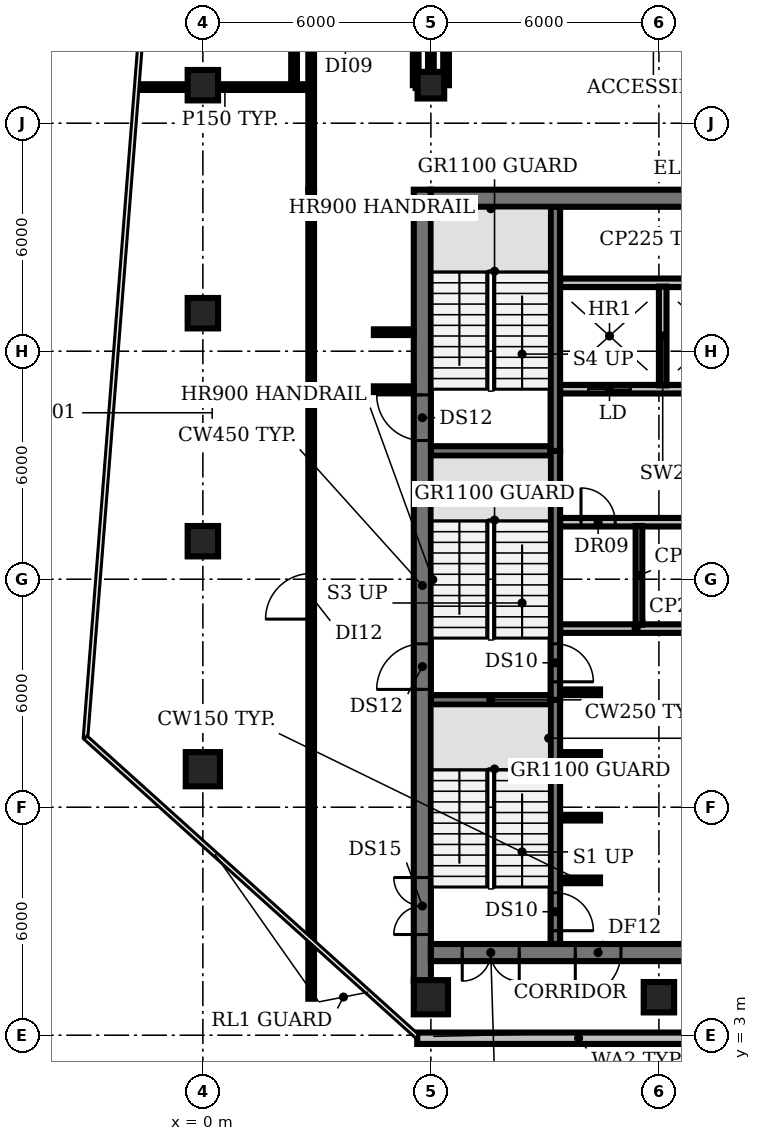
"""IFC4 building model, lengths in metres.
Left out: names, types, materials, properties, quantities, classifications, styles, units other than length and angle.
Written with IfcOpenShell. Run it as: python <this file> out.ifc"""

import sys

from ifc_helpers import new_model, si_unit, direction, frame, frame_2d, origin, origin_2d, place, context, subcontext, project, spatial, rectangle, circle, extrude, element, fill, save


model = new_model("IFC4")
c1 = context("Model", 3, precision=1e-05, world=origin(), true_north=direction((0.0, 1.0)))
c2 = subcontext(c1, "Body", "Model", "MODEL_VIEW")
j1 = project(units=[si_unit("LENGTHUNIT", "METRE"), si_unit("PLANEANGLEUNIT", "RADIAN")], contexts=[c1])
p1 = place(None, origin())
s1 = spatial("IfcSite", under=j1, at=p1, CompositionType="ELEMENT")
p2 = place(p1, origin())
s2 = spatial("IfcBuilding", under=s1, at=p2, CompositionType="ELEMENT")
p3 = place(p2, frame((0.0, 0.0, 247.4)))
s3 = spatial("IfcBuildingStorey", under=s2, at=p3, CompositionType="ELEMENT", Elevation=247.4)
p4 = place(p3, frame((0.0, 10.0, 0.0), z_axis=(0.0, 0.0, 1.0), x_axis=(1.0, 0.0, 0.0)))
e1 = element("IfcColumn", 1, at=p4, inside=s3, PredefinedType="COLUMN", context=c2, shape_type="SweptSolid", body=[
    extrude(circle(Radius=0.45, at=origin_2d()), origin(), (0.0, 0.0, 1.0), 3.85),
])
for number, where, z_axis, x_axis in (
    (2, (0.0, 16.0, 0.0), (0.0, 0.0, 1.0), (1.0, 0.0, 0.0)),
    (3, (0.0, 22.0, 0.0), (0.0, 0.0, 1.0), (1.0, 0.0, 0.0)),
    (4, (0.0, 28.0, 0.0), (0.0, 0.0, 1.0), (1.0, 0.0, 0.0)),
):
    element("IfcColumn", number, at=place(p3, frame(where, z_axis=z_axis, x_axis=x_axis)), inside=s3, PredefinedType="COLUMN", context=c2, shape_type="SweptSolid", body=[
        extrude(rectangle(XDim=0.8, YDim=0.8, at=origin_2d()), origin(), (0.0, 0.0, 1.0), 3.85),
    ])
p5 = place(p3, frame((6.0, 4.0, 0.0), z_axis=(0.0, 0.0, 1.0), x_axis=(1.0, 0.0, 0.0)))
e5 = element("IfcColumn", 5, at=p5, inside=s3, PredefinedType="COLUMN", context=c2, shape_type="SweptSolid", body=[
    extrude(circle(Radius=0.45, at=origin_2d()), origin(), (0.0, 0.0, 1.0), 3.85),
])
p6 = place(p3, frame((6.0, 28.0, 0.0), z_axis=(0.0, 0.0, 1.0), x_axis=(1.0, 0.0, 0.0)))
e6 = element("IfcColumn", 6, at=p6, inside=s3, PredefinedType="COLUMN", context=c2, shape_type="SweptSolid", body=[
    extrude(rectangle(XDim=0.7, YDim=0.7, at=origin_2d()), origin(), (0.0, 0.0, 1.0), 3.85),
])
p7 = place(p3, frame((12.0, 4.0, 0.0), z_axis=(0.0, 0.0, 1.0), x_axis=(1.0, 0.0, 0.0)))
e7 = element("IfcColumn", 7, at=p7, inside=s3, PredefinedType="COLUMN", context=c2, shape_type="SweptSolid", body=[
    extrude(rectangle(XDim=0.8, YDim=0.8, at=origin_2d()), origin(), (0.0, 0.0, 1.0), 3.85),
])
p8 = place(p3, frame((5.64, 2.92, 0.0), z_axis=(0.0, 0.0, 1.0), x_axis=(1.0, 0.0, 0.0)))
e8 = element("IfcWall", 8, at=p8, inside=s3, PredefinedType="SOLIDWALL", context=c2, shape_type="SweptSolid", body=[
    extrude(rectangle(XDim=8.493, YDim=0.3, at=frame_2d((4.247, 0.0))), origin(), (0.0, 0.0, 1.0), 3.85),
])
for number, where, z_axis, x_axis in (
    (9, (9.4, 7.075, 0.0), (0.0, 0.0, 1.0), (1.0, 0.0, 0.0)),
    (10, (9.4, 8.725, 0.0), (0.0, 0.0, 1.0), (1.0, 0.0, 0.0)),
    (11, (9.4, 10.375, 0.0), (0.0, 0.0, 1.0), (1.0, 0.0, 0.0)),
):
    element("IfcWall", number, at=place(p3, frame(where, z_axis=z_axis, x_axis=x_axis)), inside=s3, PredefinedType="SHEAR", context=c2, shape_type="SweptSolid", body=[
        extrude(rectangle(XDim=1.05, YDim=0.15, at=frame_2d((0.525, 0.0))), origin(), (0.0, 0.0, 1.0), 3.85),
    ])
p9 = place(p3, frame((6.0, 11.825, 0.0), z_axis=(0.0, 0.0, 1.0), x_axis=(1.0, 0.0, 0.0)))
e12 = element("IfcWall", 12, at=p9, inside=s3, PredefinedType="SHEAR", context=c2, shape_type="SweptSolid", body=[
    extrude(rectangle(XDim=3.15, YDim=0.25, at=frame_2d((1.575, 0.0))), origin(), (0.0, 0.0, 1.0), 3.85),
])
p10 = place(p3, frame((9.4, 12.025, 0.0), z_axis=(0.0, 0.0, 1.0), x_axis=(1.0, 0.0, 0.0)))
e13 = element("IfcWall", 13, at=p10, inside=s3, PredefinedType="SHEAR", context=c2, shape_type="SweptSolid", body=[
    extrude(rectangle(XDim=1.05, YDim=0.15, at=frame_2d((0.525, 0.0))), origin(), (0.0, 0.0, 1.0), 3.85),
])
p11 = place(p3, frame((9.4, 13.7, 0.0), z_axis=(0.0, 0.0, 1.0), x_axis=(1.0, 0.0, 0.0)))
e14 = element("IfcWall", 14, at=p11, inside=s3, PredefinedType="PARTITIONING", context=c2, shape_type="SweptSolid", body=[
    extrude(rectangle(XDim=4.0, YDim=0.225, at=frame_2d((2.0, 0.0))), origin(), (0.0, 0.0, 1.0), 3.85),
])
p12 = place(p3, frame((9.4, 16.5, 0.0), z_axis=(0.0, 0.0, 1.0), x_axis=(1.0, 0.0, 0.0)))
e15 = element("IfcWall", 15, at=p12, inside=s3, PredefinedType="PARTITIONING", context=c2, shape_type="SweptSolid", body=[
    extrude(rectangle(XDim=14.6, YDim=0.225, at=frame_2d((7.3, 0.0))), origin(), (0.0, 0.0, 1.0), 3.85),
])
p13 = place(p12, frame((0.55, 0.0, 0.0)))
e16 = element("IfcOpeningElement", 16, at=p13, cuts=e15, PredefinedType="OPENING", context=c2, shape_type="SweptSolid", body=[
    extrude(rectangle(XDim=0.9, YDim=2.1, at=frame_2d((0.45, 1.05))), frame((0.0, 0.123, 0.0), z_axis=(0.0, -1.0, 0.0), x_axis=(1.0, 0.0, 0.0)), (0.0, 0.0, 1.0), 0.245),
])
p14 = place(p12, frame((6.075, 0.0, 0.0)))
e17 = element("IfcOpeningElement", 17, at=p14, cuts=e15, PredefinedType="OPENING", context=c2, shape_type="SweptSolid", body=[
    extrude(rectangle(XDim=1.0, YDim=2.1, at=frame_2d((0.5, 1.05))), frame((0.0, 0.123, 0.0), z_axis=(0.0, -1.0, 0.0), x_axis=(1.0, 0.0, 0.0)), (0.0, 0.0, 1.0), 0.245),
])
p15 = place(p12, frame((11.647, 0.0, 0.0)))
e18 = element("IfcOpeningElement", 18, at=p15, cuts=e15, PredefinedType="OPENING", context=c2, shape_type="SweptSolid", body=[
    extrude(rectangle(XDim=0.9, YDim=2.1, at=frame_2d((0.45, 1.05))), frame((0.0, 0.123, 0.0), z_axis=(0.0, -1.0, 0.0), x_axis=(1.0, 0.0, 0.0)), (0.0, 0.0, 1.0), 0.245),
])
p16 = place(p12, frame((13.423, 0.0, 0.0)))
e19 = element("IfcOpeningElement", 19, at=p16, cuts=e15, PredefinedType="OPENING", context=c2, shape_type="SweptSolid", body=[
    extrude(rectangle(XDim=0.9, YDim=2.1, at=frame_2d((0.45, 1.05))), frame((0.0, 0.123, 0.0), z_axis=(0.0, -1.0, 0.0), x_axis=(1.0, 0.0, 0.0)), (0.0, 0.0, 1.0), 0.245),
])
p17 = place(p3, frame((6.0, 18.375, 0.0), z_axis=(0.0, 0.0, 1.0), x_axis=(1.0, 0.0, 0.0)))
e20 = element("IfcWall", 20, at=p17, inside=s3, PredefinedType="SHEAR", context=c2, shape_type="SweptSolid", body=[
    extrude(rectangle(XDim=3.15, YDim=0.25, at=frame_2d((1.575, 0.0))), origin(), (0.0, 0.0, 1.0), 3.85),
])
p18 = place(p3, frame((24.0, 20.0, 0.0), z_axis=(0.0, 0.0, 1.0), x_axis=(-1.0, 0.0, 0.0)))
e21 = element("IfcWall", 21, at=p18, inside=s3, PredefinedType="PARTITIONING", context=c2, shape_type="SweptSolid", body=[
    extrude(rectangle(XDim=14.6, YDim=0.225, at=frame_2d((7.3, 0.0))), origin(), (0.0, 0.0, 1.0), 3.85),
])
p19 = place(p18, frame((12.75, 0.0, 0.0)))
e22 = element("IfcOpeningElement", 22, at=p19, cuts=e21, PredefinedType="OPENING", context=c2, shape_type="SweptSolid", body=[
    extrude(rectangle(XDim=1.1, YDim=2.1, at=frame_2d((0.55, 1.05))), frame((0.0, 0.123, 0.0), z_axis=(0.0, -1.0, 0.0), x_axis=(1.0, 0.0, 0.0)), (0.0, 0.0, 1.0), 0.245),
])
p20 = place(p18, frame((9.95, 0.0, 0.0)))
e23 = element("IfcOpeningElement", 23, at=p20, cuts=e21, PredefinedType="OPENING", context=c2, shape_type="SweptSolid", body=[
    extrude(rectangle(XDim=1.1, YDim=2.1, at=frame_2d((0.55, 1.05))), frame((0.0, 0.123, 0.0), z_axis=(0.0, -1.0, 0.0), x_axis=(1.0, 0.0, 0.0)), (0.0, 0.0, 1.0), 0.245),
])
p21 = place(p18, frame((7.15, 0.0, 0.0)))
e24 = element("IfcOpeningElement", 24, at=p21, cuts=e21, PredefinedType="OPENING", context=c2, shape_type="SweptSolid", body=[
    extrude(rectangle(XDim=1.1, YDim=2.1, at=frame_2d((0.55, 1.05))), frame((0.0, 0.123, 0.0), z_axis=(0.0, -1.0, 0.0), x_axis=(1.0, 0.0, 0.0)), (0.0, 0.0, 1.0), 0.245),
])
p22 = place(p18, frame((4.35, 0.0, 0.0)))
e25 = element("IfcOpeningElement", 25, at=p22, cuts=e21, PredefinedType="OPENING", context=c2, shape_type="SweptSolid", body=[
    extrude(rectangle(XDim=1.1, YDim=2.1, at=frame_2d((0.55, 1.05))), frame((0.0, 0.123, 0.0), z_axis=(0.0, -1.0, 0.0), x_axis=(1.0, 0.0, 0.0)), (0.0, 0.0, 1.0), 0.245),
])
p23 = place(p18, frame((2.137, 0.0, 0.0)))
e26 = element("IfcOpeningElement", 26, at=p23, cuts=e21, PredefinedType="OPENING", context=c2, shape_type="SweptSolid", body=[
    extrude(rectangle(XDim=0.9, YDim=2.1, at=frame_2d((0.45, 1.05))), frame((0.0, 0.123, 0.0), z_axis=(0.0, -1.0, 0.0), x_axis=(1.0, 0.0, 0.0)), (0.0, 0.0, 1.0), 0.245),
])
p24 = place(p18, frame((0.363, 0.0, 0.0)))
e27 = element("IfcOpeningElement", 27, at=p24, cuts=e21, PredefinedType="OPENING", context=c2, shape_type="SweptSolid", body=[
    extrude(rectangle(XDim=0.9, YDim=2.1, at=frame_2d((0.45, 1.05))), frame((0.0, 0.123, 0.0), z_axis=(0.0, -1.0, 0.0), x_axis=(1.0, 0.0, 0.0)), (0.0, 0.0, 1.0), 0.245),
])
p25 = place(p3, frame((9.4, 22.8, 0.0), z_axis=(0.0, 0.0, 1.0), x_axis=(1.0, 0.0, 0.0)))
e28 = element("IfcWall", 28, at=p25, inside=s3, PredefinedType="PARTITIONING", context=c2, shape_type="SweptSolid", body=[
    extrude(rectangle(XDim=14.6, YDim=0.225, at=frame_2d((7.3, 0.0))), origin(), (0.0, 0.0, 1.0), 3.85),
])
p26 = place(p3, frame((9.275, 11.825, 0.0), z_axis=(0.0, 0.0, 1.0), x_axis=(0.0, -1.0, 0.0)))
e29 = element("IfcWall", 29, at=p26, inside=s3, PredefinedType="SHEAR", context=c2, shape_type="SweptSolid", body=[
    extrude(rectangle(XDim=6.425, YDim=0.25, at=frame_2d((3.212, 0.0))), origin(), (0.0, 0.0, 1.0), 3.85),
])
p27 = place(p26, frame((5.075, 0.0, 0.0)))
e30 = element("IfcOpeningElement", 30, at=p27, cuts=e29, PredefinedType="OPENING", context=c2, shape_type="SweptSolid", body=[
    extrude(rectangle(XDim=1.0, YDim=2.1, at=frame_2d((0.5, 1.05))), frame((0.0, 0.135, 0.0), z_axis=(0.0, -1.0, 0.0), x_axis=(1.0, 0.0, 0.0)), (0.0, 0.0, 1.0), 0.27),
])
p28 = place(p3, frame((9.275, 18.375, 0.0), z_axis=(0.0, 0.0, 1.0), x_axis=(0.0, -1.0, 0.0)))
e31 = element("IfcWall", 31, at=p28, inside=s3, PredefinedType="SHEAR", context=c2, shape_type="SweptSolid", body=[
    extrude(rectangle(XDim=6.55, YDim=0.25, at=frame_2d((3.275, 0.0))), origin(), (0.0, 0.0, 1.0), 3.85),
])
p29 = place(p28, frame((5.075, 0.0, 0.0)))
e32 = element("IfcOpeningElement", 32, at=p29, cuts=e31, PredefinedType="OPENING", context=c2, shape_type="SweptSolid", body=[
    extrude(rectangle(XDim=1.0, YDim=2.1, at=frame_2d((0.5, 1.05))), frame((0.0, 0.135, 0.0), z_axis=(0.0, -1.0, 0.0), x_axis=(1.0, 0.0, 0.0)), (0.0, 0.0, 1.0), 0.27),
])
p30 = place(p3, frame((9.275, 18.375, 0.0), z_axis=(0.0, 0.0, 1.0), x_axis=(0.0, 1.0, 0.0)))
e33 = element("IfcWall", 33, at=p30, inside=s3, PredefinedType="SHEAR", context=c2, shape_type="SweptSolid", body=[
    extrude(rectangle(XDim=6.425, YDim=0.25, at=frame_2d((3.212, 0.0))), origin(), (0.0, 0.0, 1.0), 3.85),
])
p31 = place(p3, frame((11.475, 13.8, 0.0), z_axis=(0.0, 0.0, 1.0), x_axis=(0.0, 1.0, 0.0)))
e34 = element("IfcWall", 34, at=p31, inside=s3, PredefinedType="PARTITIONING", context=c2, shape_type="SweptSolid", body=[
    extrude(rectangle(XDim=2.6, YDim=0.175, at=frame_2d((1.3, 0.0))), origin(), (0.0, 0.0, 1.0), 3.85),
])
p32 = place(p3, frame((12.1, 20.1, 0.0), z_axis=(0.0, 0.0, 1.0), x_axis=(0.0, 1.0, 0.0)))
e35 = element("IfcWall", 35, at=p32, inside=s3, PredefinedType="SOLIDWALL", context=c2, shape_type="SweptSolid", body=[
    extrude(rectangle(XDim=2.6, YDim=0.2, at=frame_2d((1.3, 0.0))), origin(), (0.0, 0.0, 1.0), 3.85),
])
p33 = place(p3, frame((5.775, 4.42, 0.0), z_axis=(0.0, 0.0, 1.0), x_axis=(0.0, 1.0, 0.0)))
e36 = element("IfcWall", 36, at=p33, inside=s3, PredefinedType="SHEAR", context=c2, shape_type="SweptSolid", body=[
    extrude(rectangle(XDim=20.83, YDim=0.45, at=frame_2d((10.415, 0.0))), origin(), (0.0, 0.0, 1.0), 3.85),
])
p34 = place(p33, frame((1.23, 0.0, 0.0)))
e37 = element("IfcOpeningElement", 37, at=p34, cuts=e36, PredefinedType="OPENING", context=c2, shape_type="SweptSolid", body=[
    extrude(rectangle(XDim=1.5, YDim=2.1, at=frame_2d((0.75, 1.05))), frame((0.0, 0.235, 0.0), z_axis=(0.0, -1.0, 0.0), x_axis=(1.0, 0.0, 0.0)), (0.0, 0.0, 1.0), 0.47),
])
p35 = place(p33, frame((7.68, 0.0, 0.0)))
e38 = element("IfcOpeningElement", 38, at=p35, cuts=e36, PredefinedType="OPENING", context=c2, shape_type="SweptSolid", body=[
    extrude(rectangle(XDim=1.2, YDim=2.1, at=frame_2d((0.6, 1.05))), frame((0.0, 0.235, 0.0), z_axis=(0.0, -1.0, 0.0), x_axis=(1.0, 0.0, 0.0)), (0.0, 0.0, 1.0), 0.47),
])
p36 = place(p33, frame((14.23, 0.0, 0.0)))
e39 = element("IfcOpeningElement", 39, at=p36, cuts=e36, PredefinedType="OPENING", context=c2, shape_type="SweptSolid", body=[
    extrude(rectangle(XDim=1.2, YDim=2.1, at=frame_2d((0.6, 1.05))), frame((0.0, 0.235, 0.0), z_axis=(0.0, -1.0, 0.0), x_axis=(1.0, 0.0, 0.0)), (0.0, 0.0, 1.0), 0.47),
])
p37 = place(p3, frame((24.0, 5.175, 0.0), z_axis=(0.0, 0.0, 1.0), x_axis=(-1.0, 0.0, 0.0)))
e40 = element("IfcWall", 40, at=p37, inside=s3, PredefinedType="SHEAR", context=c2, shape_type="SweptSolid", body=[
    extrude(rectangle(XDim=18.0, YDim=0.45, at=frame_2d((9.0, 0.0))), origin(), (0.0, 0.0, 1.0), 3.85),
])
p38 = place(p37, frame((0.825, 0.0, 0.0)))
e41 = element("IfcOpeningElement", 41, at=p38, cuts=e40, PredefinedType="OPENING", context=c2, shape_type="SweptSolid", body=[
    extrude(rectangle(XDim=1.5, YDim=2.1, at=frame_2d((0.75, 1.05))), frame((0.0, 0.235, 0.0), z_axis=(0.0, -1.0, 0.0), x_axis=(1.0, 0.0, 0.0)), (0.0, 0.0, 1.0), 0.47),
])
p39 = place(p37, frame((15.675, 0.0, 0.0)))
e42 = element("IfcOpeningElement", 42, at=p39, cuts=e40, PredefinedType="OPENING", context=c2, shape_type="SweptSolid", body=[
    extrude(rectangle(XDim=1.5, YDim=2.1, at=frame_2d((0.75, 1.05))), frame((0.0, 0.235, 0.0), z_axis=(0.0, -1.0, 0.0), x_axis=(1.0, 0.0, 0.0)), (0.0, 0.0, 1.0), 0.47),
])
p40 = place(p37, frame((13.0, 0.0, 0.0)))
e43 = element("IfcOpeningElement", 43, at=p40, cuts=e40, PredefinedType="OPENING", context=c2, shape_type="SweptSolid", body=[
    extrude(rectangle(XDim=1.2, YDim=2.1, at=frame_2d((0.6, 1.05))), frame((0.0, 0.235, 0.0), z_axis=(0.0, -1.0, 0.0), x_axis=(1.0, 0.0, 0.0)), (0.0, 0.0, 1.0), 0.47),
])
p41 = place(p37, frame((4.4, 0.0, 0.0)))
e44 = element("IfcOpeningElement", 44, at=p41, cuts=e40, PredefinedType="OPENING", context=c2, shape_type="SweptSolid", body=[
    extrude(rectangle(XDim=1.0, YDim=2.1, at=frame_2d((0.5, 1.05))), frame((0.0, 0.235, 0.0), z_axis=(0.0, -1.0, 0.0), x_axis=(1.0, 0.0, 0.0)), (0.0, 0.0, 1.0), 0.47),
])
p42 = place(p3, frame((6.0, 25.025, 0.0), z_axis=(0.0, 0.0, 1.0), x_axis=(1.0, 0.0, 0.0)))
e45 = element("IfcWall", 45, at=p42, inside=s3, PredefinedType="SHEAR", context=c2, shape_type="SweptSolid", body=[
    extrude(rectangle(XDim=18.0, YDim=0.45, at=frame_2d((9.0, 0.0))), origin(), (0.0, 0.0, 1.0), 3.85),
])
p43 = place(p3, frame((-1.69, 27.95, 0.0), z_axis=(0.0, 0.0, 1.0), x_axis=(1.0, 0.0, 0.0)))
e46 = element("IfcWall", 46, at=p43, inside=s3, PredefinedType="PARTITIONING", context=c2, shape_type="SweptSolid", body=[
    extrude(rectangle(XDim=4.54, YDim=0.15, at=frame_2d((2.27, 0.0))), origin(), (0.0, 0.0, 1.0), 2.88),
])
p44 = place(p3, frame((2.4, 27.95, 0.0), z_axis=(0.0, 0.0, 1.0), x_axis=(0.0, 1.0, 0.0)))
e47 = element("IfcWall", 47, at=p44, inside=s3, PredefinedType="PARTITIONING", context=c2, shape_type="SweptSolid", body=[
    extrude(rectangle(XDim=6.0, YDim=0.15, at=frame_2d((3.0, 0.0))), origin(), (0.0, 0.0, 1.0), 2.88),
])
p45 = place(p3, frame((2.85, 3.96, 0.0), z_axis=(0.0, 0.0, 1.0), x_axis=(0.0, 1.0, 0.0)))
e48 = element("IfcWall", 48, at=p45, inside=s3, PredefinedType="PARTITIONING", context=c2, shape_type="SweptSolid", body=[
    extrude(rectangle(XDim=21.29, YDim=0.15, at=frame_2d((10.645, 0.0))), origin(), (0.0, 0.0, 1.0), 2.88),
])
p46 = place(p45, frame((9.99, 0.0, 0.0)))
e49 = element("IfcOpeningElement", 49, at=p46, cuts=e48, PredefinedType="OPENING", context=c2, shape_type="SweptSolid", body=[
    extrude(rectangle(XDim=1.2, YDim=2.1, at=frame_2d((0.6, 1.05))), frame((0.0, 0.085, 0.0), z_axis=(0.0, -1.0, 0.0), x_axis=(1.0, 0.0, 0.0)), (0.0, 0.0, 1.0), 0.17),
])
p47 = place(p3, frame((2.85, 25.25, 0.0), z_axis=(0.0, 0.0, 1.0), x_axis=(0.0, 1.0, 0.0)))
e50 = element("IfcWall", 50, at=p47, inside=s3, PredefinedType="PARTITIONING", context=c2, shape_type="SweptSolid", body=[
    extrude(rectangle(XDim=3.9, YDim=0.15, at=frame_2d((1.95, 0.0))), origin(), (0.0, 0.0, 1.0), 2.88),
])
for number, where, z_axis, x_axis in (
    (51, (4.5, 20.0, 0.0), (0.0, 0.0, 1.0), (1.0, 0.0, 0.0)),
    (52, (4.5, 21.5, 0.0), (0.0, 0.0, 1.0), (1.0, 0.0, 0.0)),
):
    element("IfcWall", number, at=place(p3, frame(where, z_axis=z_axis, x_axis=x_axis)), inside=s3, PredefinedType="PARTITIONING", context=c2, shape_type="SweptSolid", body=[
        extrude(rectangle(XDim=1.05, YDim=0.15, at=frame_2d((0.525, 0.0))), origin(), (0.0, 0.0, 1.0), 2.88),
    ])
p48 = place(p3, frame((5.6, 28.0, 0.0), z_axis=(0.0, 0.0, 1.0), x_axis=(0.0, 1.0, 0.0)))
e53 = element("IfcWall", 53, at=p48, inside=s3, PredefinedType="PARTITIONING", context=c2, shape_type="SweptSolid", body=[
    extrude(rectangle(XDim=1.15, YDim=0.15, at=frame_2d((0.575, 0.0))), origin(), (0.0, 0.0, 1.0), 2.88),
])
p49 = place(p3, frame((5.6, 28.0, 0.0), z_axis=(0.0, 0.0, 1.0), x_axis=(1.0, 0.0, 0.0)))
e54 = element("IfcWall", 54, at=p49, inside=s3, PredefinedType="PARTITIONING", context=c2, shape_type="SweptSolid", body=[
    extrude(rectangle(XDim=0.4, YDim=0.15, at=frame_2d((0.2, 0.0))), origin(), (0.0, 0.0, 1.0), 2.88),
])
p50 = place(p3, frame((6.0, 28.0, 0.0), z_axis=(0.0, 0.0, 1.0), x_axis=(0.0, 1.0, 0.0)))
e55 = element("IfcWall", 55, at=p50, inside=s3, PredefinedType="PARTITIONING", context=c2, shape_type="SweptSolid", body=[
    extrude(rectangle(XDim=5.95, YDim=0.15, at=frame_2d((2.975, 0.0))), origin(), (0.0, 0.0, 1.0), 2.88),
])
p51 = place(p3, frame((6.4, 28.0, 0.0), z_axis=(0.0, 0.0, 1.0), x_axis=(0.0, 1.0, 0.0)))
e56 = element("IfcWall", 56, at=p51, inside=s3, PredefinedType="PARTITIONING", context=c2, shape_type="SweptSolid", body=[
    extrude(rectangle(XDim=1.15, YDim=0.15, at=frame_2d((0.575, 0.0))), origin(), (0.0, 0.0, 1.0), 2.88),
])
p52 = place(p13, origin())
e57 = element("IfcDoor", 57, at=p52, inside=s3, OperationType="SINGLE_SWING_LEFT", PredefinedType="DOOR", context=c2, shape_type="SweptSolid", body=[
    extrude(rectangle(XDim=0.9, YDim=2.1, at=frame_2d((0.45, 1.05))), frame((0.0, 0.025, 0.0), z_axis=(0.0, -1.0, 0.0), x_axis=(1.0, 0.0, 0.0)), (0.0, 0.0, 1.0), 0.05),
])
fill(e16, e57)
p53 = place(p19, origin())
e58 = element("IfcDoor", 58, at=p53, inside=s3, OperationType="DOUBLE_DOOR_SLIDING", PredefinedType="DOOR", context=c2, shape_type="SweptSolid", body=[
    extrude(rectangle(XDim=1.1, YDim=2.1, at=frame_2d((0.55, 1.05))), frame((0.0, 0.025, 0.0), z_axis=(0.0, -1.0, 0.0), x_axis=(1.0, 0.0, 0.0)), (0.0, 0.0, 1.0), 0.05),
])
fill(e22, e58)
p54 = place(p27, origin())
e59 = element("IfcDoor", 59, at=p54, inside=s3, OperationType="SINGLE_SWING_RIGHT", PredefinedType="DOOR", context=c2, shape_type="SweptSolid", body=[
    extrude(rectangle(XDim=1.0, YDim=2.1, at=frame_2d((0.5, 1.05))), frame((0.0, 0.025, 0.0), z_axis=(0.0, -1.0, 0.0), x_axis=(1.0, 0.0, 0.0)), (0.0, 0.0, 1.0), 0.05),
])
fill(e30, e59)
p55 = place(p29, origin())
e60 = element("IfcDoor", 60, at=p55, inside=s3, OperationType="SINGLE_SWING_RIGHT", PredefinedType="DOOR", context=c2, shape_type="SweptSolid", body=[
    extrude(rectangle(XDim=1.0, YDim=2.1, at=frame_2d((0.5, 1.05))), frame((0.0, 0.025, 0.0), z_axis=(0.0, -1.0, 0.0), x_axis=(1.0, 0.0, 0.0)), (0.0, 0.0, 1.0), 0.05),
])
fill(e32, e60)
p56 = place(p34, origin())
e61 = element("IfcDoor", 61, at=p56, inside=s3, OperationType="DOUBLE_DOOR_SINGLE_SWING", PredefinedType="DOOR", context=c2, shape_type="SweptSolid", body=[
    extrude(rectangle(XDim=1.5, YDim=2.1, at=frame_2d((0.75, 1.05))), frame((0.0, 0.025, 0.0), z_axis=(0.0, -1.0, 0.0), x_axis=(1.0, 0.0, 0.0)), (0.0, 0.0, 1.0), 0.05),
])
fill(e37, e61)
p57 = place(p35, origin())
e62 = element("IfcDoor", 62, at=p57, inside=s3, OperationType="SINGLE_SWING_LEFT", PredefinedType="DOOR", context=c2, shape_type="SweptSolid", body=[
    extrude(rectangle(XDim=1.2, YDim=2.1, at=frame_2d((0.6, 1.05))), frame((0.0, 0.025, 0.0), z_axis=(0.0, -1.0, 0.0), x_axis=(1.0, 0.0, 0.0)), (0.0, 0.0, 1.0), 0.05),
])
fill(e38, e62)
p58 = place(p36, origin())
e63 = element("IfcDoor", 63, at=p58, inside=s3, OperationType="SINGLE_SWING_RIGHT", PredefinedType="DOOR", context=c2, shape_type="SweptSolid", body=[
    extrude(rectangle(XDim=1.2, YDim=2.1, at=frame_2d((0.6, 1.05))), frame((0.0, 0.025, 0.0), z_axis=(0.0, -1.0, 0.0), x_axis=(1.0, 0.0, 0.0)), (0.0, 0.0, 1.0), 0.05),
])
fill(e39, e63)
p59 = place(p39, origin())
e64 = element("IfcDoor", 64, at=p59, inside=s3, OperationType="DOUBLE_DOOR_SINGLE_SWING", PredefinedType="DOOR", context=c2, shape_type="SweptSolid", body=[
    extrude(rectangle(XDim=1.5, YDim=2.1, at=frame_2d((0.75, 1.05))), frame((0.0, 0.025, 0.0), z_axis=(0.0, -1.0, 0.0), x_axis=(1.0, 0.0, 0.0)), (0.0, 0.0, 1.0), 0.05),
])
fill(e42, e64)
p60 = place(p40, origin())
e65 = element("IfcDoor", 65, at=p60, inside=s3, OperationType="SINGLE_SWING_RIGHT", PredefinedType="DOOR", context=c2, shape_type="SweptSolid", body=[
    extrude(rectangle(XDim=1.2, YDim=2.1, at=frame_2d((0.6, 1.05))), frame((0.0, 0.025, 0.0), z_axis=(0.0, -1.0, 0.0), x_axis=(1.0, 0.0, 0.0)), (0.0, 0.0, 1.0), 0.05),
])
fill(e43, e65)
p61 = place(p46, origin())
e66 = element("IfcDoor", 66, at=p61, inside=s3, OperationType="SINGLE_SWING_LEFT", PredefinedType="DOOR", context=c2, shape_type="SweptSolid", body=[
    extrude(rectangle(XDim=1.2, YDim=2.1, at=frame_2d((0.6, 1.05))), frame((0.0, 0.025, 0.0), z_axis=(0.0, -1.0, 0.0), x_axis=(1.0, 0.0, 0.0)), (0.0, 0.0, 1.0), 0.05),
])
fill(e49, e66)
save(model, sys.argv[1])
